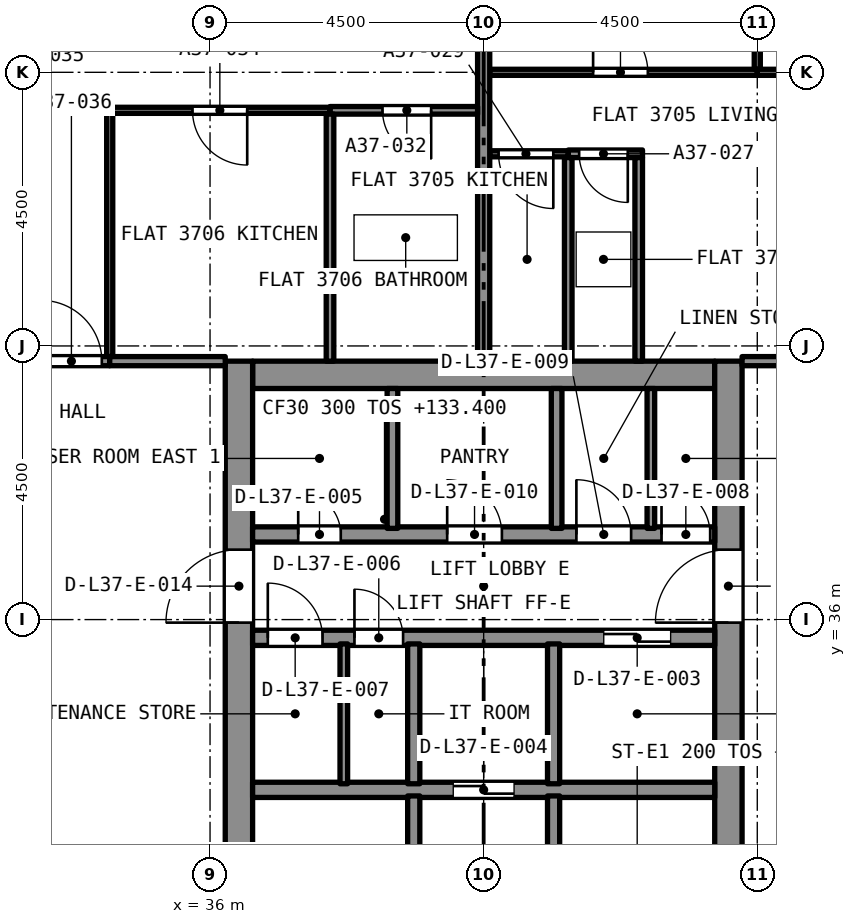
"""IFC4 building model, lengths in metres.
Left out: names, types, materials, properties, quantities, classifications, styles, units other than length and angle.
Written with IfcOpenShell. Run it as: python <this file> out.ifc"""

import sys

from ifc_helpers import new_model, si_unit, direction, frame, frame_2d, origin, place, context, subcontext, project, spatial, rectangle, extrude, element, fill, save


model = new_model("IFC4")
c1 = context("Model", 3, precision=1e-05, world=origin(), true_north=direction((0.0, 1.0)))
c2 = subcontext(c1, "Body", "Model", "MODEL_VIEW")
j1 = project(units=[si_unit("LENGTHUNIT", "METRE"), si_unit("PLANEANGLEUNIT", "RADIAN")], contexts=[c1])
p1 = place(None, origin())
s1 = spatial("IfcSite", under=j1, at=p1, CompositionType="ELEMENT")
p2 = place(p1, origin())
s2 = spatial("IfcBuilding", under=s1, at=p2, CompositionType="ELEMENT")
p3 = place(p2, frame((0.0, 0.0, 133.4)))
s3 = spatial("IfcBuildingStorey", under=s2, at=p3, CompositionType="ELEMENT", Elevation=133.4)
p4 = place(p3, frame((36.7, 40.025, 0.0), z_axis=(0.0, 0.0, 1.0), x_axis=(1.0, 0.0, 0.0)))
e1 = element("IfcWall", 1, at=p4, inside=s3, PredefinedType="SOLIDWALL", context=c2, shape_type="SweptSolid", body=[
    extrude(rectangle(XDim=7.6, YDim=0.45, at=frame_2d((3.8, 0.0))), origin(), (0.0, 0.0, 1.0), 3.2),
])
p5 = place(p3, frame((36.475, 27.25, 0.0), z_axis=(0.0, 0.0, 1.0), x_axis=(0.0, 1.0, 0.0)))
e2 = element("IfcWall", 2, at=p5, inside=s3, PredefinedType="SOLIDWALL", context=c2, shape_type="SweptSolid", body=[
    extrude(rectangle(XDim=13.0, YDim=0.45, at=frame_2d((6.5, 0.0))), origin(), (0.0, 0.0, 1.0), 3.2),
])
p6 = place(p5, frame((8.7, 0.0, 0.0)))
e3 = element("IfcOpeningElement", 3, at=p6, cuts=e2, PredefinedType="OPENING", context=c2, shape_type="SweptSolid", body=[
    extrude(rectangle(XDim=1.2, YDim=2.1, at=frame_2d((0.6, 1.05))), frame((0.0, 0.235, 0.0), z_axis=(0.0, -1.0, 0.0), x_axis=(1.0, 0.0, 0.0)), (0.0, 0.0, 1.0), 0.47),
])
p7 = place(p3, frame((44.525, 27.25, 0.0), z_axis=(0.0, 0.0, 1.0), x_axis=(0.0, 1.0, 0.0)))
e4 = element("IfcWall", 4, at=p7, inside=s3, PredefinedType="SOLIDWALL", context=c2, shape_type="SweptSolid", body=[
    extrude(rectangle(XDim=13.0, YDim=0.45, at=frame_2d((6.5, 0.0))), origin(), (0.0, 0.0, 1.0), 3.2),
])
p8 = place(p7, frame((8.7, 0.0, 0.0)))
e5 = element("IfcOpeningElement", 5, at=p8, cuts=e4, PredefinedType="OPENING", context=c2, shape_type="SweptSolid", body=[
    extrude(rectangle(XDim=1.2, YDim=2.1, at=frame_2d((0.6, 1.05))), frame((0.0, 0.235, 0.0), z_axis=(0.0, -1.0, 0.0), x_axis=(1.0, 0.0, 0.0)), (0.0, 0.0, 1.0), 0.47),
])
p9 = place(p3, frame((43.113, 43.66, 0.0), z_axis=(0.0, 0.0, 1.0), x_axis=(-1.0, 0.0, 0.0)))
e6 = element("IfcWall", 6, at=p9, inside=s3, PredefinedType="PARTITIONING", context=c2, shape_type="SweptSolid", body=[
    extrude(rectangle(XDim=1.222, YDim=0.125, at=frame_2d((0.611, 0.0))), origin(), (0.0, 0.0, 1.0), 2.9),
])
p10 = place(p9, frame((0.242, 0.0, 0.0)))
e7 = element("IfcOpeningElement", 7, at=p10, cuts=e6, PredefinedType="OPENING", context=c2, shape_type="SweptSolid", body=[
    extrude(rectangle(XDim=0.8, YDim=2.1, at=frame_2d((0.4, 1.05))), frame((0.0, 0.073, 0.0), z_axis=(0.0, -1.0, 0.0), x_axis=(1.0, 0.0, 0.0)), (0.0, 0.0, 1.0), 0.145),
])
for number, where, z_axis, x_axis in (
    (8, (43.05, 40.25, 0.0), (0.0, 0.0, 1.0), (0.0, 1.0, 0.0)),
    (9, (41.891, 40.25, 0.0), (0.0, 0.0, 1.0), (0.0, 1.0, 0.0)),
):
    element("IfcWall", number, at=place(p3, frame(where, z_axis=z_axis, x_axis=x_axis)), inside=s3, PredefinedType="PARTITIONING", context=c2, shape_type="SweptSolid", body=[
        extrude(rectangle(XDim=3.347, YDim=0.125, at=frame_2d((1.674, 0.0))), origin(), (0.0, 0.0, 1.0), 2.9),
    ])
p11 = place(p3, frame((40.6, 45.0, 0.0), z_axis=(0.0, 0.0, 1.0), x_axis=(1.0, 0.0, 0.0)))
e10 = element("IfcWall", 10, at=p11, inside=s3, PredefinedType="PARTITIONING", context=c2, shape_type="SweptSolid", body=[
    extrude(rectangle(XDim=4.4, YDim=0.1, at=frame_2d((2.2, 0.0))), origin(), (0.0, 0.0, 1.0), 2.9),
])
p12 = place(p11, frame((1.7, 0.0, 0.0)))
e11 = element("IfcOpeningElement", 11, at=p12, cuts=e10, PredefinedType="OPENING", context=c2, shape_type="SweptSolid", body=[
    extrude(rectangle(XDim=0.9, YDim=2.1, at=frame_2d((0.45, 1.05))), frame((0.0, 0.06, 0.0), z_axis=(0.0, -1.0, 0.0), x_axis=(1.0, 0.0, 0.0)), (0.0, 0.0, 1.0), 0.12),
])
p13 = place(p3, frame((45.0, 45.05, 0.0), z_axis=(0.0, 0.0, 1.0), x_axis=(0.0, 1.0, 0.0)))
e12 = element("IfcWall", 12, at=p13, inside=s3, PredefinedType="PARTITIONING", context=c2, shape_type="SweptSolid", body=[
    extrude(rectangle(XDim=3.936, YDim=0.1, at=frame_2d((1.968, 0.0))), origin(), (0.0, 0.0, 1.0), 2.9),
])
p14 = place(p3, frame((41.891, 43.66, 0.0), z_axis=(0.0, 0.0, 1.0), x_axis=(-1.0, 0.0, 0.0)))
e13 = element("IfcWall", 13, at=p14, inside=s3, PredefinedType="PARTITIONING", context=c2, shape_type="SweptSolid", body=[
    extrude(rectangle(XDim=1.291, YDim=0.1, at=frame_2d((0.646, 0.0))), origin(), (0.0, 0.0, 1.0), 2.9),
])
p15 = place(p14, frame((0.246, 0.0, 0.0)))
e14 = element("IfcOpeningElement", 14, at=p15, cuts=e13, PredefinedType="OPENING", context=c2, shape_type="SweptSolid", body=[
    extrude(rectangle(XDim=0.9, YDim=2.1, at=frame_2d((0.45, 1.05))), frame((0.0, 0.06, 0.0), z_axis=(0.0, -1.0, 0.0), x_axis=(1.0, 0.0, 0.0)), (0.0, 0.0, 1.0), 0.12),
])
p16 = place(p3, frame((45.0, 45.0, 0.0), z_axis=(0.0, 0.0, 1.0), x_axis=(1.0, 0.0, 0.0)))
e15 = element("IfcWall", 15, at=p16, inside=s3, PredefinedType="PARTITIONING", context=c2, shape_type="SweptSolid", body=[
    extrude(rectangle(XDim=3.986, YDim=0.1, at=frame_2d((1.993, 0.0))), origin(), (0.0, 0.0, 1.0), 2.9),
])
p17 = place(p16, frame((1.512, 0.0, 0.0)))
e16 = element("IfcOpeningElement", 16, at=p17, cuts=e15, PredefinedType="OPENING", context=c2, shape_type="SweptSolid", body=[
    extrude(rectangle(XDim=1.0, YDim=2.1, at=frame_2d((0.5, 1.05))), frame((0.0, 0.06, 0.0), z_axis=(0.0, -1.0, 0.0), x_axis=(1.0, 0.0, 0.0)), (0.0, 0.0, 1.0), 0.12),
])
p18 = place(p3, frame((44.75, 40.25, 0.0), z_axis=(0.0, 0.0, 1.0), x_axis=(1.0, 0.0, 0.0)))
e17 = element("IfcWall", 17, at=p18, inside=s3, PredefinedType="PARTITIONING", context=c2, shape_type="SweptSolid", body=[
    extrude(rectangle(XDim=4.275, YDim=0.15, at=frame_2d((2.137, 0.0))), origin(), (0.0, 0.0, 1.0), 2.9),
])
p19 = place(p18, frame((2.0, 0.0, 0.0)))
e18 = element("IfcOpeningElement", 18, at=p19, cuts=e17, PredefinedType="OPENING", context=c2, shape_type="SweptSolid", body=[
    extrude(rectangle(XDim=1.0, YDim=2.1, at=frame_2d((0.5, 1.05))), frame((0.0, 0.085, 0.0), z_axis=(0.0, -1.0, 0.0), x_axis=(1.0, 0.0, 0.0)), (0.0, 0.0, 1.0), 0.17),
])
p20 = place(p3, frame((40.5, 40.25, 0.0), z_axis=(0.0, 0.0, 1.0), x_axis=(0.0, 1.0, 0.0)))
e19 = element("IfcWall", 19, at=p20, inside=s3, PredefinedType="PARTITIONING", context=c2, shape_type="SweptSolid", body=[
    extrude(rectangle(XDim=8.775, YDim=0.2, at=frame_2d((4.387, 0.0))), origin(), (0.0, 0.0, 1.0), 2.9),
])
p21 = place(p3, frame((40.4, 44.375, 0.0), z_axis=(0.0, 0.0, 1.0), x_axis=(-1.0, 0.0, 0.0)))
e20 = element("IfcWall", 20, at=p21, inside=s3, PredefinedType="PARTITIONING", context=c2, shape_type="SweptSolid", body=[
    extrude(rectangle(XDim=2.427, YDim=0.125, at=frame_2d((1.214, 0.0))), origin(), (0.0, 0.0, 1.0), 2.9),
])
p22 = place(p21, frame((0.764, 0.0, 0.0)))
e21 = element("IfcOpeningElement", 21, at=p22, cuts=e20, PredefinedType="OPENING", context=c2, shape_type="SweptSolid", body=[
    extrude(rectangle(XDim=0.8, YDim=2.1, at=frame_2d((0.4, 1.05))), frame((0.0, 0.073, 0.0), z_axis=(0.0, -1.0, 0.0), x_axis=(1.0, 0.0, 0.0)), (0.0, 0.0, 1.0), 0.145),
])
p23 = place(p3, frame((37.973, 40.25, 0.0), z_axis=(0.0, 0.0, 1.0), x_axis=(0.0, 1.0, 0.0)))
e22 = element("IfcWall", 22, at=p23, inside=s3, PredefinedType="PARTITIONING", context=c2, shape_type="SweptSolid", body=[
    extrude(rectangle(XDim=4.062, YDim=0.125, at=frame_2d((2.031, 0.0))), origin(), (0.0, 0.0, 1.0), 2.9),
])
p24 = place(p3, frame((37.973, 44.375, 0.0), z_axis=(0.0, 0.0, 1.0), x_axis=(-1.0, 0.0, 0.0)))
e23 = element("IfcWall", 23, at=p24, inside=s3, PredefinedType="PARTITIONING", context=c2, shape_type="SweptSolid", body=[
    extrude(rectangle(XDim=3.673, YDim=0.1, at=frame_2d((1.836, 0.0))), origin(), (0.0, 0.0, 1.0), 2.9),
])
p25 = place(p24, frame((1.361, 0.0, 0.0)))
e24 = element("IfcOpeningElement", 24, at=p25, cuts=e23, PredefinedType="OPENING", context=c2, shape_type="SweptSolid", body=[
    extrude(rectangle(XDim=0.9, YDim=2.1, at=frame_2d((0.45, 1.05))), frame((0.0, 0.06, 0.0), z_axis=(0.0, -1.0, 0.0), x_axis=(1.0, 0.0, 0.0)), (0.0, 0.0, 1.0), 0.12),
])
p26 = place(p3, frame((34.35, 40.325, 0.0), z_axis=(0.0, 0.0, 1.0), x_axis=(0.0, 1.0, 0.0)))
e25 = element("IfcWall", 25, at=p26, inside=s3, PredefinedType="PARTITIONING", context=c2, shape_type="SweptSolid", body=[
    extrude(rectangle(XDim=4.0, YDim=0.1, at=frame_2d((2.0, 0.0))), origin(), (0.0, 0.0, 1.0), 2.9),
])
p27 = place(p3, frame((31.975, 40.25, 0.0), z_axis=(0.0, 0.0, 1.0), x_axis=(1.0, 0.0, 0.0)))
e26 = element("IfcWall", 26, at=p27, inside=s3, PredefinedType="PARTITIONING", context=c2, shape_type="SweptSolid", body=[
    extrude(rectangle(XDim=2.375, YDim=0.15, at=frame_2d((1.188, 0.0))), origin(), (0.0, 0.0, 1.0), 2.9),
])
p28 = place(p27, frame((1.245, 0.0, 0.0)))
e27 = element("IfcOpeningElement", 27, at=p28, cuts=e26, PredefinedType="OPENING", context=c2, shape_type="SweptSolid", body=[
    extrude(rectangle(XDim=1.0, YDim=2.1, at=frame_2d((0.5, 1.05))), frame((0.0, 0.085, 0.0), z_axis=(0.0, -1.0, 0.0), x_axis=(1.0, 0.0, 0.0)), (0.0, 0.0, 1.0), 0.17),
])
p29 = place(p3, frame((34.35, 40.25, 0.0), z_axis=(0.0, 0.0, 1.0), x_axis=(1.0, 0.0, 0.0)))
e28 = element("IfcWall", 28, at=p29, inside=s3, PredefinedType="PARTITIONING", context=c2, shape_type="SweptSolid", body=[
    extrude(rectangle(XDim=1.9, YDim=0.15, at=frame_2d((0.95, 0.0))), origin(), (0.0, 0.0, 1.0), 2.9),
])
p30 = place(p3, frame((36.7, 33.2, 0.0), z_axis=(0.0, 0.0, 1.0), x_axis=(1.0, 0.0, 0.0)))
e29 = element("IfcWall", 29, at=p30, inside=s3, PredefinedType="SOLIDWALL", context=c2, shape_type="SweptSolid", body=[
    extrude(rectangle(XDim=7.6, YDim=0.25, at=frame_2d((3.8, 0.0))), origin(), (0.0, 0.0, 1.0), 2.9),
])
p31 = place(p30, frame((3.3, 0.0, 0.0)))
e30 = element("IfcOpeningElement", 30, at=p31, cuts=e29, PredefinedType="OPENING", context=c2, shape_type="SweptSolid", body=[
    extrude(rectangle(XDim=1.0, YDim=2.1, at=frame_2d((0.5, 1.05))), frame((0.0, 0.135, 0.0), z_axis=(0.0, -1.0, 0.0), x_axis=(1.0, 0.0, 0.0)), (0.0, 0.0, 1.0), 0.27),
])
p32 = place(p3, frame((36.7, 35.7, 0.0), z_axis=(0.0, 0.0, 1.0), x_axis=(1.0, 0.0, 0.0)))
e31 = element("IfcWall", 31, at=p32, inside=s3, PredefinedType="SOLIDWALL", context=c2, shape_type="SweptSolid", body=[
    extrude(rectangle(XDim=7.6, YDim=0.25, at=frame_2d((3.8, 0.0))), origin(), (0.0, 0.0, 1.0), 2.9),
])
p33 = place(p32, frame((5.775, 0.0, 0.0)))
e32 = element("IfcOpeningElement", 32, at=p33, cuts=e31, PredefinedType="OPENING", context=c2, shape_type="SweptSolid", body=[
    extrude(rectangle(XDim=1.1, YDim=2.4, at=frame_2d((0.55, 1.2))), frame((0.0, 0.135, 0.0), z_axis=(0.0, -1.0, 0.0), x_axis=(1.0, 0.0, 0.0)), (0.0, 0.0, 1.0), 0.27),
])
p34 = place(p32, frame((1.675, 0.0, 0.0)))
e33 = element("IfcOpeningElement", 33, at=p34, cuts=e31, PredefinedType="OPENING", context=c2, shape_type="SweptSolid", body=[
    extrude(rectangle(XDim=0.8, YDim=2.1, at=frame_2d((0.4, 1.05))), frame((0.0, 0.135, 0.0), z_axis=(0.0, -1.0, 0.0), x_axis=(1.0, 0.0, 0.0)), (0.0, 0.0, 1.0), 0.27),
])
p35 = place(p32, frame((0.25, 0.0, 0.0)))
e34 = element("IfcOpeningElement", 34, at=p35, cuts=e31, PredefinedType="OPENING", context=c2, shape_type="SweptSolid", body=[
    extrude(rectangle(XDim=0.9, YDim=2.1, at=frame_2d((0.45, 1.05))), frame((0.0, 0.135, 0.0), z_axis=(0.0, -1.0, 0.0), x_axis=(1.0, 0.0, 0.0)), (0.0, 0.0, 1.0), 0.27),
])
p36 = place(p3, frame((36.7, 37.4, 0.0), z_axis=(0.0, 0.0, 1.0), x_axis=(1.0, 0.0, 0.0)))
e35 = element("IfcWall", 35, at=p36, inside=s3, PredefinedType="SOLIDWALL", context=c2, shape_type="SweptSolid", body=[
    extrude(rectangle(XDim=7.6, YDim=0.25, at=frame_2d((3.8, 0.0))), origin(), (0.0, 0.0, 1.0), 2.9),
])
p37 = place(p36, frame((0.75, 0.0, 0.0)))
e36 = element("IfcOpeningElement", 36, at=p37, cuts=e35, PredefinedType="OPENING", context=c2, shape_type="SweptSolid", body=[
    extrude(rectangle(XDim=0.7, YDim=2.1, at=frame_2d((0.35, 1.05))), frame((0.0, 0.135, 0.0), z_axis=(0.0, -1.0, 0.0), x_axis=(1.0, 0.0, 0.0)), (0.0, 0.0, 1.0), 0.27),
])
p38 = place(p36, frame((6.725, 0.0, 0.0)))
e37 = element("IfcOpeningElement", 37, at=p38, cuts=e35, PredefinedType="OPENING", context=c2, shape_type="SweptSolid", body=[
    extrude(rectangle(XDim=0.8, YDim=2.1, at=frame_2d((0.4, 1.05))), frame((0.0, 0.135, 0.0), z_axis=(0.0, -1.0, 0.0), x_axis=(1.0, 0.0, 0.0)), (0.0, 0.0, 1.0), 0.27),
])
p39 = place(p36, frame((5.325, 0.0, 0.0)))
e38 = element("IfcOpeningElement", 38, at=p39, cuts=e35, PredefinedType="OPENING", context=c2, shape_type="SweptSolid", body=[
    extrude(rectangle(XDim=0.9, YDim=2.1, at=frame_2d((0.45, 1.05))), frame((0.0, 0.135, 0.0), z_axis=(0.0, -1.0, 0.0), x_axis=(1.0, 0.0, 0.0)), (0.0, 0.0, 1.0), 0.27),
])
p40 = place(p36, frame((3.2, 0.0, 0.0)))
e39 = element("IfcOpeningElement", 39, at=p40, cuts=e35, PredefinedType="OPENING", context=c2, shape_type="SweptSolid", body=[
    extrude(rectangle(XDim=0.9, YDim=2.1, at=frame_2d((0.45, 1.05))), frame((0.0, 0.135, 0.0), z_axis=(0.0, -1.0, 0.0), x_axis=(1.0, 0.0, 0.0)), (0.0, 0.0, 1.0), 0.27),
])
p41 = place(p3, frame((41.65, 27.7, 0.0), z_axis=(0.0, 0.0, 1.0), x_axis=(0.0, 1.0, 0.0)))
e40 = element("IfcWall", 40, at=p41, inside=s3, PredefinedType="SOLIDWALL", context=c2, shape_type="SweptSolid", body=[
    extrude(rectangle(XDim=5.4, YDim=0.2, at=frame_2d((2.7, 0.0))), origin(), (0.0, 0.0, 1.0), 2.9),
])
p42 = place(p41, frame((0.2, 0.0, 0.0)))
e41 = element("IfcOpeningElement", 41, at=p42, cuts=e40, PredefinedType="OPENING", context=c2, shape_type="SweptSolid", body=[
    extrude(rectangle(XDim=0.9, YDim=2.1, at=frame_2d((0.45, 1.05))), frame((0.0, 0.11, 0.0), z_axis=(0.0, -1.0, 0.0), x_axis=(1.0, 0.0, 0.0)), (0.0, 0.0, 1.0), 0.22),
])
p43 = place(p3, frame((39.35, 27.7, 0.0), z_axis=(0.0, 0.0, 1.0), x_axis=(0.0, 1.0, 0.0)))
e42 = element("IfcWall", 42, at=p43, inside=s3, PredefinedType="SOLIDWALL", context=c2, shape_type="SweptSolid", body=[
    extrude(rectangle(XDim=5.4, YDim=0.2, at=frame_2d((2.7, 0.0))), origin(), (0.0, 0.0, 1.0), 2.9),
])
p44 = place(p43, frame((0.2, 0.0, 0.0)))
e43 = element("IfcOpeningElement", 43, at=p44, cuts=e42, PredefinedType="OPENING", context=c2, shape_type="SweptSolid", body=[
    extrude(rectangle(XDim=0.9, YDim=2.1, at=frame_2d((0.45, 1.05))), frame((0.0, 0.11, 0.0), z_axis=(0.0, -1.0, 0.0), x_axis=(1.0, 0.0, 0.0)), (0.0, 0.0, 1.0), 0.22),
])
for number, where, z_axis, x_axis in (
    (44, (41.65, 33.3, 0.0), (0.0, 0.0, 1.0), (0.0, 1.0, 0.0)),
    (45, (39.35, 33.3, 0.0), (0.0, 0.0, 1.0), (0.0, 1.0, 0.0)),
):
    element("IfcWall", number, at=place(p3, frame(where, z_axis=z_axis, x_axis=x_axis)), inside=s3, PredefinedType="SOLIDWALL", context=c2, shape_type="SweptSolid", body=[
        extrude(rectangle(XDim=2.3, YDim=0.2, at=frame_2d((1.15, 0.0))), origin(), (0.0, 0.0, 1.0), 2.9),
    ])
for number, where, z_axis, x_axis in (
    (46, (41.7, 37.5, 0.0), (0.0, 0.0, 1.0), (0.0, 1.0, 0.0)),
    (47, (39.0, 37.5, 0.0), (0.0, 0.0, 1.0), (0.0, 1.0, 0.0)),
):
    element("IfcWall", number, at=place(p3, frame(where, z_axis=z_axis, x_axis=x_axis)), inside=s3, PredefinedType="SOLIDWALL", context=c2, shape_type="SweptSolid", body=[
        extrude(rectangle(XDim=2.3, YDim=0.175, at=frame_2d((1.15, 0.0))), origin(), (0.0, 0.0, 1.0), 2.9),
    ])
for number, where, z_axis, x_axis in (
    (48, (38.2, 33.3, 0.0), (0.0, 0.0, 1.0), (0.0, 1.0, 0.0)),
    (49, (43.25, 37.5, 0.0), (0.0, 0.0, 1.0), (0.0, 1.0, 0.0)),
):
    element("IfcWall", number, at=place(p3, frame(where, z_axis=z_axis, x_axis=x_axis)), inside=s3, PredefinedType="PARTITIONING", context=c2, shape_type="SweptSolid", body=[
        extrude(rectangle(XDim=2.3, YDim=0.125, at=frame_2d((1.15, 0.0))), origin(), (0.0, 0.0, 1.0), 2.9),
    ])
p45 = place(p10, origin())
e50 = element("IfcDoor", 50, at=p45, inside=s3, OperationType="SINGLE_SWING_RIGHT", PredefinedType="DOOR", context=c2, shape_type="SweptSolid", body=[
    extrude(rectangle(XDim=0.8, YDim=2.1, at=frame_2d((0.4, 1.05))), frame((0.0, 0.025, 0.0), z_axis=(0.0, -1.0, 0.0), x_axis=(1.0, 0.0, 0.0)), (0.0, 0.0, 1.0), 0.05),
])
fill(e7, e50)
p46 = place(p12, origin())
e51 = element("IfcDoor", 51, at=p46, inside=s3, OperationType="SINGLE_SWING_LEFT", PredefinedType="DOOR", context=c2, shape_type="SweptSolid", body=[
    extrude(rectangle(XDim=0.9, YDim=2.1, at=frame_2d((0.45, 1.05))), frame((0.0, 0.025, 0.0), z_axis=(0.0, -1.0, 0.0), x_axis=(1.0, 0.0, 0.0)), (0.0, 0.0, 1.0), 0.05),
])
fill(e11, e51)
p47 = place(p15, origin())
e52 = element("IfcDoor", 52, at=p47, inside=s3, OperationType="SINGLE_SWING_RIGHT", PredefinedType="DOOR", context=c2, shape_type="SweptSolid", body=[
    extrude(rectangle(XDim=0.9, YDim=2.1, at=frame_2d((0.45, 1.05))), frame((0.0, 0.025, 0.0), z_axis=(0.0, -1.0, 0.0), x_axis=(1.0, 0.0, 0.0)), (0.0, 0.0, 1.0), 0.05),
])
fill(e14, e52)
p48 = place(p22, origin())
e53 = element("IfcDoor", 53, at=p48, inside=s3, OperationType="SINGLE_SWING_LEFT", PredefinedType="DOOR", context=c2, shape_type="SweptSolid", body=[
    extrude(rectangle(XDim=0.8, YDim=2.1, at=frame_2d((0.4, 1.05))), frame((0.0, 0.025, 0.0), z_axis=(0.0, -1.0, 0.0), x_axis=(1.0, 0.0, 0.0)), (0.0, 0.0, 1.0), 0.05),
])
fill(e21, e53)
p49 = place(p25, origin())
e54 = element("IfcDoor", 54, at=p49, inside=s3, OperationType="SINGLE_SWING_LEFT", PredefinedType="DOOR", context=c2, shape_type="SweptSolid", body=[
    extrude(rectangle(XDim=0.9, YDim=2.1, at=frame_2d((0.45, 1.05))), frame((0.0, 0.025, 0.0), z_axis=(0.0, -1.0, 0.0), x_axis=(1.0, 0.0, 0.0)), (0.0, 0.0, 1.0), 0.05),
])
fill(e24, e54)
p50 = place(p28, origin())
e55 = element("IfcDoor", 55, at=p50, inside=s3, OperationType="SINGLE_SWING_RIGHT", PredefinedType="DOOR", context=c2, shape_type="SweptSolid", body=[
    extrude(rectangle(XDim=1.0, YDim=2.1, at=frame_2d((0.5, 1.05))), frame((0.0, 0.025, 0.0), z_axis=(0.0, -1.0, 0.0), x_axis=(1.0, 0.0, 0.0)), (0.0, 0.0, 1.0), 0.05),
])
fill(e27, e55)
p51 = place(p33, origin())
e56 = element("IfcDoor", 56, at=p51, inside=s3, OperationType="SLIDING_TO_LEFT", PredefinedType="DOOR", context=c2, shape_type="SweptSolid", body=[
    extrude(rectangle(XDim=1.1, YDim=2.4, at=frame_2d((0.55, 1.2))), frame((0.0, 0.025, 0.0), z_axis=(0.0, -1.0, 0.0), x_axis=(1.0, 0.0, 0.0)), (0.0, 0.0, 1.0), 0.05),
])
fill(e32, e56)
p52 = place(p31, origin())
e57 = element("IfcDoor", 57, at=p52, inside=s3, OperationType="SLIDING_TO_LEFT", PredefinedType="DOOR", context=c2, shape_type="SweptSolid", body=[
    extrude(rectangle(XDim=1.0, YDim=2.1, at=frame_2d((0.5, 1.05))), frame((0.0, 0.025, 0.0), z_axis=(0.0, -1.0, 0.0), x_axis=(1.0, 0.0, 0.0)), (0.0, 0.0, 1.0), 0.05),
])
fill(e30, e57)
p53 = place(p37, origin())
e58 = element("IfcDoor", 58, at=p53, inside=s3, OperationType="SINGLE_SWING_LEFT", PredefinedType="DOOR", context=c2, shape_type="SweptSolid", body=[
    extrude(rectangle(XDim=0.7, YDim=2.1, at=frame_2d((0.35, 1.05))), frame((0.0, 0.025, 0.0), z_axis=(0.0, -1.0, 0.0), x_axis=(1.0, 0.0, 0.0)), (0.0, 0.0, 1.0), 0.05),
])
fill(e36, e58)
p54 = place(p34, origin())
e59 = element("IfcDoor", 59, at=p54, inside=s3, OperationType="SINGLE_SWING_LEFT", PredefinedType="DOOR", context=c2, shape_type="SweptSolid", body=[
    extrude(rectangle(XDim=0.8, YDim=2.1, at=frame_2d((0.4, 1.05))), frame((0.0, 0.025, 0.0), z_axis=(0.0, -1.0, 0.0), x_axis=(1.0, 0.0, 0.0)), (0.0, 0.0, 1.0), 0.05),
])
fill(e33, e59)
p55 = place(p35, origin())
e60 = element("IfcDoor", 60, at=p55, inside=s3, OperationType="SINGLE_SWING_LEFT", PredefinedType="DOOR", context=c2, shape_type="SweptSolid", body=[
    extrude(rectangle(XDim=0.9, YDim=2.1, at=frame_2d((0.45, 1.05))), frame((0.0, 0.025, 0.0), z_axis=(0.0, -1.0, 0.0), x_axis=(1.0, 0.0, 0.0)), (0.0, 0.0, 1.0), 0.05),
])
fill(e34, e60)
p56 = place(p38, origin())
e61 = element("IfcDoor", 61, at=p56, inside=s3, OperationType="SINGLE_SWING_LEFT", PredefinedType="DOOR", context=c2, shape_type="SweptSolid", body=[
    extrude(rectangle(XDim=0.8, YDim=2.1, at=frame_2d((0.4, 1.05))), frame((0.0, 0.025, 0.0), z_axis=(0.0, -1.0, 0.0), x_axis=(1.0, 0.0, 0.0)), (0.0, 0.0, 1.0), 0.05),
])
fill(e37, e61)
p57 = place(p39, origin())
e62 = element("IfcDoor", 62, at=p57, inside=s3, OperationType="SINGLE_SWING_LEFT", PredefinedType="DOOR", context=c2, shape_type="SweptSolid", body=[
    extrude(rectangle(XDim=0.9, YDim=2.1, at=frame_2d((0.45, 1.05))), frame((0.0, 0.025, 0.0), z_axis=(0.0, -1.0, 0.0), x_axis=(1.0, 0.0, 0.0)), (0.0, 0.0, 1.0), 0.05),
])
fill(e38, e62)
p58 = place(p40, origin())
e63 = element("IfcDoor", 63, at=p58, inside=s3, OperationType="SINGLE_SWING_LEFT", PredefinedType="DOOR", context=c2, shape_type="SweptSolid", body=[
    extrude(rectangle(XDim=0.9, YDim=2.1, at=frame_2d((0.45, 1.05))), frame((0.0, 0.025, 0.0), z_axis=(0.0, -1.0, 0.0), x_axis=(1.0, 0.0, 0.0)), (0.0, 0.0, 1.0), 0.05),
])
fill(e39, e63)
p59 = place(p6, origin())
e64 = element("IfcDoor", 64, at=p59, inside=s3, OperationType="SINGLE_SWING_LEFT", PredefinedType="DOOR", context=c2, shape_type="SweptSolid", body=[
    extrude(rectangle(XDim=1.2, YDim=2.1, at=frame_2d((0.6, 1.05))), frame((0.0, 0.025, 0.0), z_axis=(0.0, -1.0, 0.0), x_axis=(1.0, 0.0, 0.0)), (0.0, 0.0, 1.0), 0.05),
])
fill(e3, e64)
p60 = place(p8, origin())
e65 = element("IfcDoor", 65, at=p60, inside=s3, OperationType="SINGLE_SWING_LEFT", PredefinedType="DOOR", context=c2, shape_type="SweptSolid", body=[
    extrude(rectangle(XDim=1.2, YDim=2.1, at=frame_2d((0.6, 1.05))), frame((0.0, 0.025, 0.0), z_axis=(0.0, -1.0, 0.0), x_axis=(1.0, 0.0, 0.0)), (0.0, 0.0, 1.0), 0.05),
])
fill(e5, e65)
save(model, sys.argv[1])
